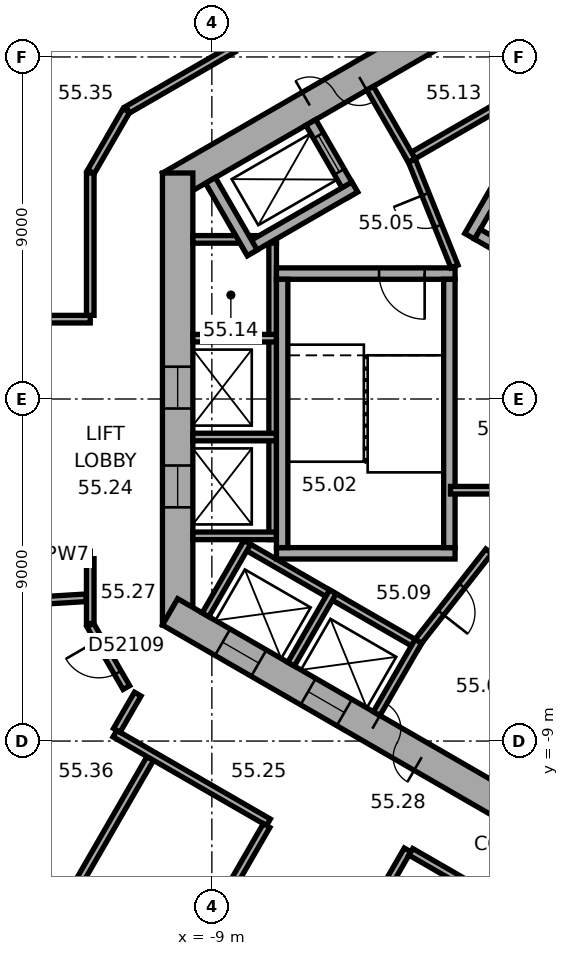
"""IFC4 building model, lengths in metres.
Left out: names, types, materials, properties, quantities, classifications, styles, units other than length and angle.
Written with IfcOpenShell. Run it as: python <this file> out.ifc"""

import sys

from ifc_helpers import new_model, si_unit, direction, frame, frame_2d, origin, place, context, subcontext, project, spatial, rectangle, extrude, element, fill, save


model = new_model("IFC4")
c1 = context("Model", 3, precision=1e-05, world=origin(), true_north=direction((0.0, 1.0)))
c2 = subcontext(c1, "Body", "Model", "MODEL_VIEW")
j1 = project(units=[si_unit("LENGTHUNIT", "METRE"), si_unit("PLANEANGLEUNIT", "RADIAN")], contexts=[c1])
p1 = place(None, origin())
s1 = spatial("IfcSite", under=j1, at=p1, CompositionType="ELEMENT")
p2 = place(p1, origin())
s2 = spatial("IfcBuilding", under=s1, at=p2, CompositionType="ELEMENT")
p3 = place(p2, frame((0.0, 0.0, 225.4)))
s3 = spatial("IfcBuildingStorey", under=s2, at=p3, CompositionType="ELEMENT", Elevation=225.4)
p4 = place(p3, frame((0.2, 11.547, 0.0), z_axis=(0.0, 0.0, 1.0), x_axis=(-0.866023897231, -0.500002609418, 0.0)))
e1 = element("IfcWall", 1, at=p4, inside=s3, PredefinedType="SHEAR", context=c2, shape_type="SweptSolid", body=[
    extrude(rectangle(XDim=11.894, YDim=0.8, at=frame_2d((5.947, 0.0))), origin(), (0.0, 0.0, 1.0), 3.7),
])
p5 = place(p4, frame((6.147, 0.0, 0.0)))
e2 = element("IfcOpeningElement", 2, at=p5, cuts=e1, PredefinedType="OPENING", context=c2, shape_type="SweptSolid", body=[
    extrude(rectangle(XDim=1.5, YDim=2.1, at=frame_2d((0.75, 1.05))), frame((0.0, 0.41, 0.0), z_axis=(0.0, -1.0, 0.0), x_axis=(1.0, 0.0, 0.0)), (0.0, 0.0, 1.0), 0.82),
])
p6 = place(p4, frame((2.997, 0.0, 0.0)))
e3 = element("IfcOpeningElement", 3, at=p6, cuts=e1, PredefinedType="OPENING", context=c2, shape_type="SweptSolid", body=[
    extrude(rectangle(XDim=0.9, YDim=2.1, at=frame_2d((0.45, 1.05))), frame((0.0, 0.41, 0.0), z_axis=(0.0, -1.0, 0.0), x_axis=(1.0, 0.0, 0.0)), (0.0, 0.0, 1.0), 0.82),
])
p7 = place(p3, frame((-9.9, 5.947, 0.0), z_axis=(0.0, 0.0, 1.0), x_axis=(0.0, -1.0, 0.0)))
e4 = element("IfcWall", 4, at=p7, inside=s3, PredefinedType="SHEAR", context=c2, shape_type="SweptSolid", body=[
    extrude(rectangle(XDim=11.894, YDim=0.8, at=frame_2d((5.947, 0.0))), origin(), (0.0, 0.0, 1.0), 3.7),
])
p8 = place(p7, frame((5.097, 0.0, 0.0)))
e5 = element("IfcOpeningElement", 5, at=p8, cuts=e4, PredefinedType="OPENING", context=c2, shape_type="SweptSolid", body=[
    extrude(rectangle(XDim=1.1, YDim=2.1, at=frame_2d((0.55, 1.05))), frame((0.0, 0.41, 0.0), z_axis=(0.0, -1.0, 0.0), x_axis=(1.0, 0.0, 0.0)), (0.0, 0.0, 1.0), 0.82),
])
p9 = place(p7, frame((7.697, 0.0, 0.0)))
e6 = element("IfcOpeningElement", 6, at=p9, cuts=e4, PredefinedType="OPENING", context=c2, shape_type="SweptSolid", body=[
    extrude(rectangle(XDim=1.1, YDim=2.1, at=frame_2d((0.55, 1.05))), frame((0.0, 0.41, 0.0), z_axis=(0.0, -1.0, 0.0), x_axis=(1.0, 0.0, 0.0)), (0.0, 0.0, 1.0), 0.82),
])
p10 = place(p3, frame((-10.1, -5.6, 0.0), z_axis=(0.0, 0.0, 1.0), x_axis=(0.866023897231, -0.500002609418, 0.0)))
e7 = element("IfcWall", 7, at=p10, inside=s3, PredefinedType="SHEAR", context=c2, shape_type="SweptSolid", body=[
    extrude(rectangle(XDim=11.894, YDim=0.8, at=frame_2d((5.947, 0.0))), origin(), (0.0, 0.0, 1.0), 3.7),
])
p11 = place(p10, frame((6.147, 0.0, 0.0)))
e8 = element("IfcOpeningElement", 8, at=p11, cuts=e7, PredefinedType="OPENING", context=c2, shape_type="SweptSolid", body=[
    extrude(rectangle(XDim=1.5, YDim=2.1, at=frame_2d((0.75, 1.05))), frame((0.0, 0.41, 0.0), z_axis=(0.0, -1.0, 0.0), x_axis=(1.0, 0.0, 0.0)), (0.0, 0.0, 1.0), 0.82),
])
p12 = place(p10, frame((1.597, 0.0, 0.0)))
e9 = element("IfcOpeningElement", 9, at=p12, cuts=e7, PredefinedType="OPENING", context=c2, shape_type="SweptSolid", body=[
    extrude(rectangle(XDim=1.1, YDim=2.1, at=frame_2d((0.55, 1.05))), frame((0.0, 0.41, 0.0), z_axis=(0.0, -1.0, 0.0), x_axis=(1.0, 0.0, 0.0)), (0.0, 0.0, 1.0), 0.82),
])
p13 = place(p10, frame((4.197, 0.0, 0.0)))
e10 = element("IfcOpeningElement", 10, at=p13, cuts=e7, PredefinedType="OPENING", context=c2, shape_type="SweptSolid", body=[
    extrude(rectangle(XDim=1.1, YDim=2.1, at=frame_2d((0.55, 1.05))), frame((0.0, 0.41, 0.0), z_axis=(0.0, -1.0, 0.0), x_axis=(1.0, 0.0, 0.0)), (0.0, 0.0, 1.0), 0.82),
])
p14 = place(p3, frame((0.803, 9.009, 0.0), z_axis=(0.0, 0.0, 1.0), x_axis=(-0.866028230842, -0.499995103361, 0.0)))
e11 = element("IfcWall", 11, at=p14, inside=s3, PredefinedType="PARTITIONING", context=c2, shape_type="SweptSolid", body=[
    extrude(rectangle(XDim=5.4, YDim=0.2, at=frame_2d((2.7, 0.0))), origin(), (0.0, 0.0, 1.0), 3.42),
])
p15 = place(p3, frame((-3.737, 6.272, 0.0), z_axis=(0.0, 0.0, 1.0), x_axis=(-0.50002983664, 0.866008176907, 0.0)))
e12 = element("IfcWall", 12, at=p15, inside=s3, PredefinedType="PARTITIONING", context=c2, shape_type="SweptSolid", body=[
    extrude(rectangle(XDim=2.2, YDim=0.2, at=frame_2d((1.1, 0.0))), origin(), (0.0, 0.0, 1.0), 3.42),
])
p16 = place(p3, frame((-7.4, 4.3, 0.0), z_axis=(0.0, 0.0, 1.0), x_axis=(0.0, -1.0, 0.0)))
e13 = element("IfcWall", 13, at=p16, inside=s3, PredefinedType="PARTITIONING", context=c2, shape_type="SweptSolid", body=[
    extrude(rectangle(XDim=8.0, YDim=0.2, at=frame_2d((4.0, 0.0))), origin(), (0.0, 0.0, 1.0), 3.42),
])
for number, where, z_axis, x_axis in (
    (14, (-7.3, 4.2, 0.0), (0.0, 0.0, 1.0), (-1.0, 0.0, 0.0)),
    (15, (-7.3, 1.6, 0.0), (0.0, 0.0, 1.0), (-1.0, 0.0, 0.0)),
    (16, (-7.3, -1.0, 0.0), (0.0, 0.0, 1.0), (-1.0, 0.0, 0.0)),
    (17, (-7.3, -3.6, 0.0), (0.0, 0.0, 1.0), (-1.0, 0.0, 0.0)),
):
    element("IfcWall", number, at=place(p3, frame(where, z_axis=z_axis, x_axis=x_axis)), inside=s3, PredefinedType="PARTITIONING", context=c2, shape_type="SweptSolid", body=[
        extrude(rectangle(XDim=2.2, YDim=0.2, at=frame_2d((1.1, 0.0))), origin(), (0.0, 0.0, 1.0), 3.42),
    ])
p17 = place(p3, frame((-8.203, -3.809, 0.0), z_axis=(0.0, 0.0, 1.0), x_axis=(0.866028230842, -0.499995103361, 0.0)))
e18 = element("IfcWall", 18, at=p17, inside=s3, PredefinedType="PARTITIONING", context=c2, shape_type="SweptSolid", body=[
    extrude(rectangle(XDim=5.4, YDim=0.2, at=frame_2d((2.7, 0.0))), origin(), (0.0, 0.0, 1.0), 3.42),
])
for number, where, z_axis, x_axis in (
    (19, (-8.067, -3.772, 0.0), (0.0, 0.0, 1.0), (-0.5, -0.866, 0.0)),
    (20, (-5.815, -5.072, 0.0), (0.0, 0.0, 1.0), (-0.5, -0.866, 0.0)),
):
    element("IfcWall", number, at=place(p3, frame(where, z_axis=z_axis, x_axis=x_axis)), inside=s3, PredefinedType="PARTITIONING", context=c2, shape_type="SweptSolid", body=[
        extrude(rectangle(XDim=2.2, YDim=0.2, at=frame_2d((1.1, 0.0))), origin(), (0.0, 0.0, 1.0), 3.42),
    ])
p18 = place(p3, frame((-3.563, -6.372, 0.0), z_axis=(0.0, 0.0, 1.0), x_axis=(-0.499994660107, -0.866028486751, 0.0)))
e21 = element("IfcWall", 21, at=p18, inside=s3, PredefinedType="PARTITIONING", context=c2, shape_type="SweptSolid", body=[
    extrude(rectangle(XDim=2.2, YDim=0.2, at=frame_2d((1.1, 0.0))), origin(), (0.0, 0.0, 1.0), 3.42),
])
p19 = place(p3, frame((-2.216, 4.282, 0.0), z_axis=(0.0, 0.0, 1.0), x_axis=(0.499977259774, 0.866038532462, 0.0)))
e22 = element("IfcWall", 22, at=p19, inside=s3, PredefinedType="SHEAR", context=c2, shape_type="SweptSolid", body=[
    extrude(rectangle(XDim=4.7, YDim=0.3, at=frame_2d((2.35, 0.0))), origin(), (0.0, 0.0, 1.0), 3.42),
])
p20 = place(p3, frame((4.103, 0.807, 0.0), z_axis=(0.0, 0.0, 1.0), x_axis=(-0.866027801685, 0.499995846692, 0.0)))
e23 = element("IfcWall", 23, at=p20, inside=s3, PredefinedType="SHEAR", context=c2, shape_type="SweptSolid", body=[
    extrude(rectangle(XDim=7.06, YDim=0.3, at=frame_2d((3.53, 0.0))), origin(), (0.0, 0.0, 1.0), 3.42),
])
p21 = place(p3, frame((-2.6, 3.3, 0.0), z_axis=(0.0, 0.0, 1.0), x_axis=(-1.0, 0.0, 0.0)))
e24 = element("IfcWall", 24, at=p21, inside=s3, PredefinedType="SHEAR", context=c2, shape_type="SweptSolid", body=[
    extrude(rectangle(XDim=4.7, YDim=0.3, at=frame_2d((2.35, 0.0))), origin(), (0.0, 0.0, 1.0), 3.42),
])
p22 = place(p21, frame((0.8, 0.0, 0.0)))
e25 = element("IfcOpeningElement", 25, at=p22, cuts=e24, PredefinedType="OPENING", context=c2, shape_type="SweptSolid", body=[
    extrude(rectangle(XDim=1.2, YDim=2.1, at=frame_2d((0.6, 1.05))), frame((0.0, 0.16, 0.0), z_axis=(0.0, -1.0, 0.0), x_axis=(1.0, 0.0, 0.0)), (0.0, 0.0, 1.0), 0.32),
])
p23 = place(p3, frame((-2.6, -4.06, 0.0), z_axis=(0.0, 0.0, 1.0), x_axis=(-1.0, 0.0, 0.0)))
e26 = element("IfcWall", 26, at=p23, inside=s3, PredefinedType="SHEAR", context=c2, shape_type="SweptSolid", body=[
    extrude(rectangle(XDim=4.7, YDim=0.3, at=frame_2d((2.35, 0.0))), origin(), (0.0, 0.0, 1.0), 3.42),
])
for number, where, z_axis, x_axis in (
    (27, (-2.75, 3.15, 0.0), (0.0, 0.0, 1.0), (0.0, -1.0, 0.0)),
    (28, (-7.15, 3.15, 0.0), (0.0, 0.0, 1.0), (0.0, -1.0, 0.0)),
):
    element("IfcWall", number, at=place(p3, frame(where, z_axis=z_axis, x_axis=x_axis)), inside=s3, PredefinedType="SHEAR", context=c2, shape_type="SweptSolid", body=[
        extrude(rectangle(XDim=7.06, YDim=0.3, at=frame_2d((3.53, 0.0))), origin(), (0.0, 0.0, 1.0), 3.42),
    ])
p24 = place(p3, frame((-5.295, 5.372, 0.0), z_axis=(0.0, 0.0, 1.0), x_axis=(-0.500077893725, 0.86598042715, 0.0)))
e29 = element("IfcWall", 29, at=p24, inside=s3, PredefinedType="SHEAR", context=c2, shape_type="SweptSolid", body=[
    extrude(rectangle(XDim=2.2, YDim=0.3, at=frame_2d((1.1, 0.0))), origin(), (0.0, 0.0, 1.0), 3.42),
])
p25 = place(p24, frame((0.7, 0.0, 0.0)))
e30 = element("IfcOpeningElement", 30, at=p25, cuts=e29, PredefinedType="OPENING", context=c2, shape_type="SweptSolid", body=[
    extrude(rectangle(XDim=1.1, YDim=2.1, at=frame_2d((0.55, 1.05))), frame((0.0, 0.16, 0.0), z_axis=(0.0, -1.0, 0.0), x_axis=(1.0, 0.0, 0.0)), (0.0, 0.0, 1.0), 0.32),
])
p26 = place(p3, frame((-5.24, 5.577, 0.0), z_axis=(0.0, 0.0, 1.0), x_axis=(-0.866014461049, -0.500018952895, 0.0)))
e31 = element("IfcWall", 31, at=p26, inside=s3, PredefinedType="SHEAR", context=c2, shape_type="SweptSolid", body=[
    extrude(rectangle(XDim=3.35, YDim=0.3, at=frame_2d((1.675, 0.0))), origin(), (0.0, 0.0, 1.0), 3.42),
])
p27 = place(p3, frame((-7.937, 3.847, 0.0), z_axis=(0.0, 0.0, 1.0), x_axis=(-0.50002983664, 0.866008176907, 0.0)))
e32 = element("IfcWall", 32, at=p27, inside=s3, PredefinedType="SHEAR", context=c2, shape_type="SweptSolid", body=[
    extrude(rectangle(XDim=2.2, YDim=0.3, at=frame_2d((1.1, 0.0))), origin(), (0.0, 0.0, 1.0), 3.42),
])
p28 = place(p3, frame((-2.615, 3.487, 0.0), z_axis=(0.0, 0.0, 1.0), x_axis=(-0.373576831041, 0.92759924068, 0.0)))
e33 = element("IfcWall", 33, at=p28, inside=s3, PredefinedType="PARTITIONING", context=c2, shape_type="SweptSolid", body=[
    extrude(rectangle(XDim=3.002, YDim=0.2, at=frame_2d((1.501, 0.0))), origin(), (0.0, 0.0, 1.0), 3.42),
])
p29 = place(p28, frame((1.15, 0.0, 0.0)))
e34 = element("IfcOpeningElement", 34, at=p29, cuts=e33, PredefinedType="OPENING", context=c2, shape_type="SweptSolid", body=[
    extrude(rectangle(XDim=0.9, YDim=2.1, at=frame_2d((0.45, 1.05))), frame((0.0, 0.11, 0.0), z_axis=(0.0, -1.0, 0.0), x_axis=(1.0, 0.0, 0.0)), (0.0, 0.0, 1.0), 0.22),
])
p30 = place(p3, frame((-1.712, -4.008, 0.0), z_axis=(0.0, 0.0, 1.0), x_axis=(-0.616549420702, -0.787316208287, 0.0)))
e35 = element("IfcWall", 35, at=p30, inside=s3, PredefinedType="PARTITIONING", context=c2, shape_type="SweptSolid", body=[
    extrude(rectangle(XDim=3.002, YDim=0.2, at=frame_2d((1.501, 0.0))), origin(), (0.0, 0.0, 1.0), 3.42),
])
p31 = place(p30, frame((1.15, 0.0, 0.0)))
e36 = element("IfcOpeningElement", 36, at=p31, cuts=e35, PredefinedType="OPENING", context=c2, shape_type="SweptSolid", body=[
    extrude(rectangle(XDim=0.9, YDim=2.1, at=frame_2d((0.45, 1.05))), frame((0.0, 0.11, 0.0), z_axis=(0.0, -1.0, 0.0), x_axis=(1.0, 0.0, 0.0)), (0.0, 0.0, 1.0), 0.22),
])
p32 = place(p3, frame((-2.72, -2.4, 0.0), z_axis=(0.0, 0.0, 1.0), x_axis=(1.0, 0.0, 0.0)))
e37 = element("IfcWall", 37, at=p32, inside=s3, PredefinedType="PARTITIONING", context=c2, shape_type="SweptSolid", body=[
    extrude(rectangle(XDim=3.883, YDim=0.2, at=frame_2d((1.941, 0.0))), origin(), (0.0, 0.0, 1.0), 3.42),
])
p33 = place(p3, frame((-19.241, -5.654, 0.0), z_axis=(0.0, 0.0, 1.0), x_axis=(0.998135538818, 0.061036432963, 0.0)))
e38 = element("IfcWall", 38, at=p33, inside=s3, PredefinedType="PARTITIONING", context=c2, shape_type="SweptSolid", body=[
    extrude(rectangle(XDim=6.944, YDim=0.2, at=frame_2d((3.472, 0.0))), origin(), (0.0, 0.0, 1.0), 2.87),
])
p34 = place(p3, frame((-13.646, -14.696, 0.0), z_axis=(0.0, 0.0, 1.0), x_axis=(0.500006596359, 0.866021595341, 0.0)))
e39 = element("IfcWall", 39, at=p34, inside=s3, PredefinedType="PARTITIONING", context=c2, shape_type="SweptSolid", body=[
    extrude(rectangle(XDim=6.049, YDim=0.2, at=frame_2d((3.025, 0.0))), origin(), (0.0, 0.0, 1.0), 3.42),
])
p35 = place(p3, frame((-13.401, -4.101, 0.0), z_axis=(0.0, 0.0, 1.0), x_axis=(1.0, 0.0, 0.0)))
e40 = element("IfcWall", 40, at=p35, inside=s3, PredefinedType="PARTITIONING", context=c2, shape_type="SweptSolid", body=[
    extrude(rectangle(XDim=1.201, YDim=0.2, at=frame_2d((0.601, 0.0))), origin(), (0.0, 0.0, 1.0), 3.42),
])
p36 = place(p3, frame((-12.2, -5.947, 0.0), z_axis=(0.0, 0.0, 1.0), x_axis=(0.500022797313, -0.86601224135, 0.0)))
e41 = element("IfcWall", 41, at=p36, inside=s3, PredefinedType="PARTITIONING", context=c2, shape_type="SweptSolid", body=[
    extrude(rectangle(XDim=1.9, YDim=0.2, at=frame_2d((0.95, 0.0))), origin(), (0.0, 0.0, 1.0), 3.42),
])
p37 = place(p36, frame((0.45, 0.0, 0.0)))
e42 = element("IfcOpeningElement", 42, at=p37, cuts=e41, PredefinedType="OPENING", context=c2, shape_type="SweptSolid", body=[
    extrude(rectangle(XDim=1.0, YDim=2.1, at=frame_2d((0.5, 1.05))), frame((0.0, 0.11, 0.0), z_axis=(0.0, -1.0, 0.0), x_axis=(1.0, 0.0, 0.0)), (0.0, 0.0, 1.0), 0.22),
])
p38 = place(p3, frame((-12.2, -4.201, 0.0), z_axis=(0.0, 0.0, 1.0), x_axis=(0.0, -1.0, 0.0)))
e43 = element("IfcWall", 43, at=p38, inside=s3, PredefinedType="PARTITIONING", context=c2, shape_type="SweptSolid", body=[
    extrude(rectangle(XDim=1.706, YDim=0.2, at=frame_2d((0.853, 0.0))), origin(), (0.0, 0.0, 1.0), 3.42),
])
p39 = place(p3, frame((-12.2, 2.101, 0.0), z_axis=(0.0, 0.0, 1.0), x_axis=(-1.0, 0.0, 0.0)))
e44 = element("IfcWall", 44, at=p39, inside=s3, PredefinedType="PARTITIONING", context=c2, shape_type="SweptSolid", body=[
    extrude(rectangle(XDim=1.101, YDim=0.2, at=frame_2d((0.551, 0.0))), origin(), (0.0, 0.0, 1.0), 3.42),
])
p40 = place(p3, frame((-12.2, 5.947, 0.0), z_axis=(0.0, 0.0, 1.0), x_axis=(0.0, -1.0, 0.0)))
e45 = element("IfcWall", 45, at=p40, inside=s3, PredefinedType="PARTITIONING", context=c2, shape_type="SweptSolid", body=[
    extrude(rectangle(XDim=3.746, YDim=0.2, at=frame_2d((1.873, 0.0))), origin(), (0.0, 0.0, 1.0), 3.42),
])
p41 = place(p3, frame((-11.551, -8.805, 0.0), z_axis=(0.0, 0.0, 1.0), x_axis=(0.866038310922, -0.499977643516, 0.0)))
e46 = element("IfcWall", 46, at=p41, inside=s3, PredefinedType="PARTITIONING", context=c2, shape_type="SweptSolid", body=[
    extrude(rectangle(XDim=4.665, YDim=0.2, at=frame_2d((2.333, 0.0))), origin(), (0.0, 0.0, 1.0), 3.42),
])
p42 = place(p3, frame((-11.25, 7.592, 0.0), z_axis=(0.0, 0.0, 1.0), x_axis=(-0.499964847546, -0.866045698112, 0.0)))
e47 = element("IfcWall", 47, at=p42, inside=s3, PredefinedType="PARTITIONING", context=c2, shape_type="SweptSolid", body=[
    extrude(rectangle(XDim=1.86, YDim=0.2, at=frame_2d((0.93, 0.0))), origin(), (0.0, 0.0, 1.0), 3.42),
])
p43 = place(p3, frame((-10.951, -7.765, 0.0), z_axis=(0.0, 0.0, 1.0), x_axis=(-0.499978356969, -0.866037899034, 0.0)))
e48 = element("IfcWall", 48, at=p43, inside=s3, PredefinedType="PARTITIONING", context=c2, shape_type="SweptSolid", body=[
    extrude(rectangle(XDim=1.101, YDim=0.2, at=frame_2d((0.551, 0.0))), origin(), (0.0, 0.0, 1.0), 3.42),
])
p44 = place(p3, frame((-10.585, -16.463, 0.0), z_axis=(0.0, 0.0, 1.0), x_axis=(0.499993802756, 0.866028981735, 0.0)))
e49 = element("IfcWall", 49, at=p44, inside=s3, PredefinedType="PARTITIONING", context=c2, shape_type="SweptSolid", body=[
    extrude(rectangle(XDim=6.049, YDim=0.2, at=frame_2d((3.024, 0.0))), origin(), (0.0, 0.0, 1.0), 2.87),
])
p45 = place(p44, frame((2.524, 0.0, 0.0)))
e50 = element("IfcOpeningElement", 50, at=p45, cuts=e49, PredefinedType="OPENING", context=c2, shape_type="SweptSolid", body=[
    extrude(rectangle(XDim=1.0, YDim=2.1, at=frame_2d((0.5, 1.05))), frame((0.0, 0.11, 0.0), z_axis=(0.0, -1.0, 0.0), x_axis=(1.0, 0.0, 0.0)), (0.0, 0.0, 1.0), 0.22),
])
p46 = place(p3, frame((-8.437, 9.217, 0.0), z_axis=(0.0, 0.0, 1.0), x_axis=(-0.866005660673, -0.500034194513, 0.0)))
e51 = element("IfcWall", 51, at=p46, inside=s3, PredefinedType="PARTITIONING", context=c2, shape_type="SweptSolid", body=[
    extrude(rectangle(XDim=3.209, YDim=0.2, at=frame_2d((1.604, 0.0))), origin(), (0.0, 0.0, 1.0), 3.42),
])
p47 = place(p3, frame((-7.525, -18.23, 0.0), z_axis=(0.0, 0.0, 1.0), x_axis=(0.499983153418, 0.866035129944, 0.0)))
e52 = element("IfcWall", 52, at=p47, inside=s3, PredefinedType="PARTITIONING", context=c2, shape_type="SweptSolid", body=[
    extrude(rectangle(XDim=7.35, YDim=0.2, at=frame_2d((3.675, 0.0))), origin(), (0.0, 0.0, 1.0), 3.42),
])
p48 = place(p47, frame((3.175, 0.0, 0.0)))
e53 = element("IfcOpeningElement", 53, at=p48, cuts=e52, PredefinedType="OPENING", context=c2, shape_type="SweptSolid", body=[
    extrude(rectangle(XDim=1.0, YDim=2.1, at=frame_2d((0.5, 1.05))), frame((0.0, 0.11, 0.0), z_axis=(0.0, -1.0, 0.0), x_axis=(1.0, 0.0, 0.0)), (0.0, 0.0, 1.0), 0.22),
])
p49 = place(p3, frame((-3.763, -11.915, 0.0), z_axis=(0.0, 0.0, 1.0), x_axis=(0.866037915695, -0.499978328108, 0.0)))
e54 = element("IfcWall", 54, at=p49, inside=s3, PredefinedType="PARTITIONING", context=c2, shape_type="SweptSolid", body=[
    extrude(rectangle(XDim=3.249, YDim=0.2, at=frame_2d((1.625, 0.0))), origin(), (0.0, 0.0, 1.0), 3.42),
])
p50 = place(p5, origin())
e55 = element("IfcDoor", 55, at=p50, inside=s3, OperationType="DOUBLE_DOOR_SINGLE_SWING", PredefinedType="DOOR", context=c2, shape_type="SweptSolid", body=[
    extrude(rectangle(XDim=1.5, YDim=2.1, at=frame_2d((0.75, 1.05))), frame((0.0, 0.025, 0.0), z_axis=(0.0, -1.0, 0.0), x_axis=(1.0, 0.0, 0.0)), (0.0, 0.0, 1.0), 0.05),
])
fill(e2, e55)
p51 = place(p11, origin())
e56 = element("IfcDoor", 56, at=p51, inside=s3, OperationType="DOUBLE_DOOR_SINGLE_SWING", PredefinedType="DOOR", context=c2, shape_type="SweptSolid", body=[
    extrude(rectangle(XDim=1.5, YDim=2.1, at=frame_2d((0.75, 1.05))), frame((0.0, 0.025, 0.0), z_axis=(0.0, -1.0, 0.0), x_axis=(1.0, 0.0, 0.0)), (0.0, 0.0, 1.0), 0.05),
])
fill(e8, e56)
p52 = place(p22, origin())
e57 = element("IfcDoor", 57, at=p52, inside=s3, OperationType="SINGLE_SWING_RIGHT", PredefinedType="DOOR", context=c2, shape_type="SweptSolid", body=[
    extrude(rectangle(XDim=1.2, YDim=2.1, at=frame_2d((0.6, 1.05))), frame((0.0, 0.025, 0.0), z_axis=(0.0, -1.0, 0.0), x_axis=(1.0, 0.0, 0.0)), (0.0, 0.0, 1.0), 0.05),
])
fill(e25, e57)
p53 = place(p29, origin())
e58 = element("IfcDoor", 58, at=p53, inside=s3, OperationType="SINGLE_SWING_LEFT", PredefinedType="DOOR", context=c2, shape_type="SweptSolid", body=[
    extrude(rectangle(XDim=0.9, YDim=2.1, at=frame_2d((0.45, 1.05))), frame((0.0, 0.025, 0.0), z_axis=(0.0, -1.0, 0.0), x_axis=(1.0, 0.0, 0.0)), (0.0, 0.0, 1.0), 0.05),
])
fill(e34, e58)
p54 = place(p31, origin())
e59 = element("IfcDoor", 59, at=p54, inside=s3, OperationType="SINGLE_SWING_LEFT", PredefinedType="DOOR", context=c2, shape_type="SweptSolid", body=[
    extrude(rectangle(XDim=0.9, YDim=2.1, at=frame_2d((0.45, 1.05))), frame((0.0, 0.025, 0.0), z_axis=(0.0, -1.0, 0.0), x_axis=(1.0, 0.0, 0.0)), (0.0, 0.0, 1.0), 0.05),
])
fill(e36, e59)
p55 = place(p25, origin())
e60 = element("IfcDoor", 60, at=p55, inside=s3, OperationType="DOUBLE_DOOR_SLIDING", PredefinedType="DOOR", context=c2, shape_type="SweptSolid", body=[
    extrude(rectangle(XDim=1.1, YDim=2.1, at=frame_2d((0.55, 1.05))), frame((0.0, 0.025, 0.0), z_axis=(0.0, -1.0, 0.0), x_axis=(1.0, 0.0, 0.0)), (0.0, 0.0, 1.0), 0.05),
])
fill(e30, e60)
p56 = place(p8, origin())
e61 = element("IfcDoor", 61, at=p56, inside=s3, OperationType="DOUBLE_DOOR_SLIDING", PredefinedType="DOOR", context=c2, shape_type="SweptSolid", body=[
    extrude(rectangle(XDim=1.1, YDim=2.1, at=frame_2d((0.55, 1.05))), frame((0.0, 0.025, 0.0), z_axis=(0.0, -1.0, 0.0), x_axis=(1.0, 0.0, 0.0)), (0.0, 0.0, 1.0), 0.05),
])
fill(e5, e61)
p57 = place(p9, origin())
e62 = element("IfcDoor", 62, at=p57, inside=s3, OperationType="DOUBLE_DOOR_SLIDING", PredefinedType="DOOR", context=c2, shape_type="SweptSolid", body=[
    extrude(rectangle(XDim=1.1, YDim=2.1, at=frame_2d((0.55, 1.05))), frame((0.0, 0.025, 0.0), z_axis=(0.0, -1.0, 0.0), x_axis=(1.0, 0.0, 0.0)), (0.0, 0.0, 1.0), 0.05),
])
fill(e6, e62)
p58 = place(p12, origin())
e63 = element("IfcDoor", 63, at=p58, inside=s3, OperationType="DOUBLE_DOOR_SLIDING", PredefinedType="DOOR", context=c2, shape_type="SweptSolid", body=[
    extrude(rectangle(XDim=1.1, YDim=2.1, at=frame_2d((0.55, 1.05))), frame((0.0, 0.025, 0.0), z_axis=(0.0, -1.0, 0.0), x_axis=(1.0, 0.0, 0.0)), (0.0, 0.0, 1.0), 0.05),
])
fill(e9, e63)
p59 = place(p13, origin())
e64 = element("IfcDoor", 64, at=p59, inside=s3, OperationType="DOUBLE_DOOR_SLIDING", PredefinedType="DOOR", context=c2, shape_type="SweptSolid", body=[
    extrude(rectangle(XDim=1.1, YDim=2.1, at=frame_2d((0.55, 1.05))), frame((0.0, 0.025, 0.0), z_axis=(0.0, -1.0, 0.0), x_axis=(1.0, 0.0, 0.0)), (0.0, 0.0, 1.0), 0.05),
])
fill(e10, e64)
p60 = place(p37, origin())
e65 = element("IfcDoor", 65, at=p60, inside=s3, OperationType="SINGLE_SWING_LEFT", PredefinedType="DOOR", context=c2, shape_type="SweptSolid", body=[
    extrude(rectangle(XDim=1.0, YDim=2.1, at=frame_2d((0.5, 1.05))), frame((0.0, 0.025, 0.0), z_axis=(0.0, -1.0, 0.0), x_axis=(1.0, 0.0, 0.0)), (0.0, 0.0, 1.0), 0.05),
])
fill(e42, e65)
save(model, sys.argv[1])
